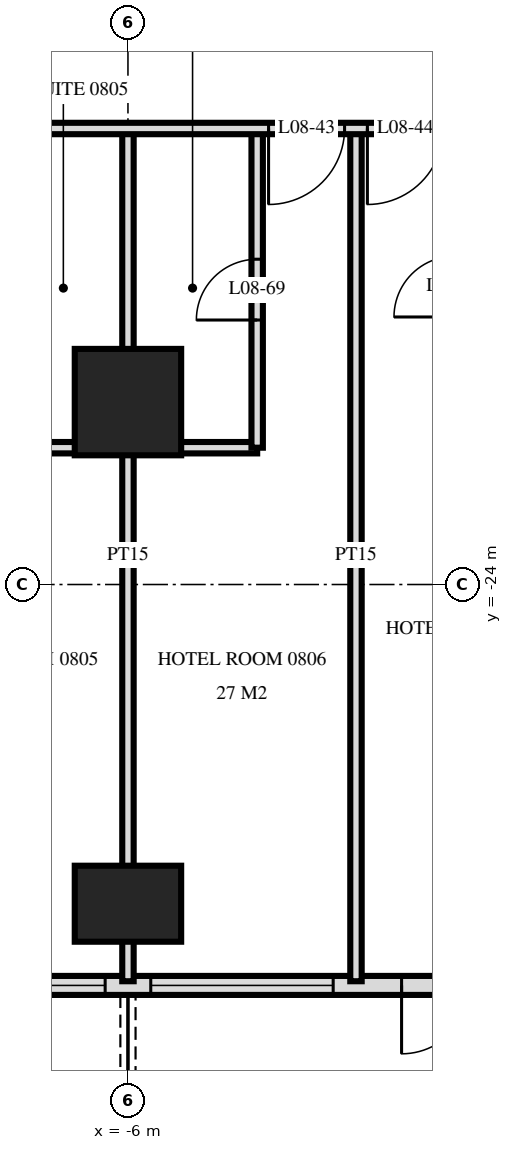
"""IFC4 building model, lengths in metres.
Left out: names, types, materials, properties, quantities, classifications, styles, units other than length and angle.
Written with IfcOpenShell. Run it as: python <this file> out.ifc"""

import sys

from ifc_helpers import new_model, si_unit, direction, frame, frame_2d, origin, origin_2d, place, context, subcontext, project, spatial, rectangle, extrude, element, fill, save


model = new_model("IFC4")
c1 = context("Model", 3, precision=1e-05, world=origin(), true_north=direction((0.0, 1.0)))
c2 = subcontext(c1, "Body", "Model", "MODEL_VIEW")
j1 = project(units=[si_unit("LENGTHUNIT", "METRE"), si_unit("PLANEANGLEUNIT", "RADIAN")], contexts=[c1])
p1 = place(None, origin())
s1 = spatial("IfcSite", under=j1, at=p1, CompositionType="ELEMENT")
p2 = place(p1, origin())
s2 = spatial("IfcBuilding", under=s1, at=p2, CompositionType="ELEMENT")
p3 = place(p2, frame((0.0, 0.0, 38.4)))
s3 = spatial("IfcBuildingStorey", under=s2, at=p3, CompositionType="ELEMENT", Elevation=38.4)
p4 = place(p3, frame((-6.0, -28.2, 0.0), z_axis=(0.0, 0.0, 1.0), x_axis=(1.0, 0.0, 0.0)))
e1 = element("IfcColumn", 1, at=p4, inside=s3, PredefinedType="COLUMN", context=c2, shape_type="SweptSolid", body=[
    extrude(rectangle(XDim=1.4, YDim=1.0, at=origin_2d()), origin(), (0.0, 0.0, 1.0), 3.6),
])
p5 = place(p3, frame((-6.0, -21.6, 0.0), z_axis=(0.0, 0.0, 1.0), x_axis=(1.0, 0.0, 0.0)))
e2 = element("IfcColumn", 2, at=p5, inside=s3, PredefinedType="COLUMN", context=c2, shape_type="SweptSolid", body=[
    extrude(rectangle(XDim=1.4, YDim=1.4, at=origin_2d()), origin(), (0.0, 0.0, 1.0), 3.6),
])
p6 = place(p3, frame((-28.775, -29.275, 0.0), z_axis=(0.0, 0.0, 1.0), x_axis=(1.0, 0.0, 0.0)))
e3 = element("IfcWall", 3, at=p6, inside=s3, PredefinedType="SOLIDWALL", context=c2, shape_type="SweptSolid", body=[
    extrude(rectangle(XDim=57.551, YDim=0.25, at=frame_2d((28.775, 0.0))), origin(), (0.0, 0.0, 1.0), 3.32),
])
p7 = place(p6, frame((0.575, 0.0, 0.0)))
e4 = element("IfcOpeningElement", 4, at=p7, cuts=e3, PredefinedType="OPENING", context=c2, shape_type="SweptSolid", body=[
    extrude(rectangle(XDim=1.8, YDim=2.4, at=frame_2d((0.9, 1.2))), frame((0.0, 0.135, 0.0), z_axis=(0.0, -1.0, 0.0), x_axis=(1.0, 0.0, 0.0)), (0.0, 0.0, 1.0), 0.27),
])
p8 = place(p6, frame((5.375, 0.0, 0.0)))
e5 = element("IfcOpeningElement", 5, at=p8, cuts=e3, PredefinedType="OPENING", context=c2, shape_type="SweptSolid", body=[
    extrude(rectangle(XDim=1.8, YDim=2.4, at=frame_2d((0.9, 1.2))), frame((0.0, 0.135, 0.0), z_axis=(0.0, -1.0, 0.0), x_axis=(1.0, 0.0, 0.0)), (0.0, 0.0, 1.0), 0.27),
])
p9 = place(p6, frame((8.075, 0.0, 0.3)))
e6 = element("IfcOpeningElement", 6, at=p9, cuts=e3, PredefinedType="OPENING", context=c2, shape_type="SweptSolid", body=[
    extrude(rectangle(XDim=2.4, YDim=2.1, at=frame_2d((1.2, 1.05))), frame((0.0, 0.135, 0.0), z_axis=(0.0, -1.0, 0.0), x_axis=(1.0, 0.0, 0.0)), (0.0, 0.0, 1.0), 0.27),
])
p10 = place(p6, frame((11.375, 0.0, 0.0)))
e7 = element("IfcOpeningElement", 7, at=p10, cuts=e3, PredefinedType="OPENING", context=c2, shape_type="SweptSolid", body=[
    extrude(rectangle(XDim=1.8, YDim=2.4, at=frame_2d((0.9, 1.2))), frame((0.0, 0.135, 0.0), z_axis=(0.0, -1.0, 0.0), x_axis=(1.0, 0.0, 0.0)), (0.0, 0.0, 1.0), 0.27),
])
p11 = place(p6, frame((14.075, 0.0, 0.3)))
e8 = element("IfcOpeningElement", 8, at=p11, cuts=e3, PredefinedType="OPENING", context=c2, shape_type="SweptSolid", body=[
    extrude(rectangle(XDim=2.4, YDim=2.1, at=frame_2d((1.2, 1.05))), frame((0.0, 0.135, 0.0), z_axis=(0.0, -1.0, 0.0), x_axis=(1.0, 0.0, 0.0)), (0.0, 0.0, 1.0), 0.27),
])
p12 = place(p6, frame((17.375, 0.0, 0.0)))
e9 = element("IfcOpeningElement", 9, at=p12, cuts=e3, PredefinedType="OPENING", context=c2, shape_type="SweptSolid", body=[
    extrude(rectangle(XDim=1.8, YDim=2.4, at=frame_2d((0.9, 1.2))), frame((0.0, 0.135, 0.0), z_axis=(0.0, -1.0, 0.0), x_axis=(1.0, 0.0, 0.0)), (0.0, 0.0, 1.0), 0.27),
])
p13 = place(p6, frame((20.075, 0.0, 0.3)))
e10 = element("IfcOpeningElement", 10, at=p13, cuts=e3, PredefinedType="OPENING", context=c2, shape_type="SweptSolid", body=[
    extrude(rectangle(XDim=2.4, YDim=2.1, at=frame_2d((1.2, 1.05))), frame((0.0, 0.135, 0.0), z_axis=(0.0, -1.0, 0.0), x_axis=(1.0, 0.0, 0.0)), (0.0, 0.0, 1.0), 0.27),
])
p14 = place(p6, frame((23.075, 0.0, 0.3)))
e11 = element("IfcOpeningElement", 11, at=p14, cuts=e3, PredefinedType="OPENING", context=c2, shape_type="SweptSolid", body=[
    extrude(rectangle(XDim=2.4, YDim=2.1, at=frame_2d((1.2, 1.05))), frame((0.0, 0.135, 0.0), z_axis=(0.0, -1.0, 0.0), x_axis=(1.0, 0.0, 0.0)), (0.0, 0.0, 1.0), 0.27),
])
p15 = place(p6, frame((26.375, 0.0, 0.0)))
e12 = element("IfcOpeningElement", 12, at=p15, cuts=e3, PredefinedType="OPENING", context=c2, shape_type="SweptSolid", body=[
    extrude(rectangle(XDim=1.8, YDim=2.4, at=frame_2d((0.9, 1.2))), frame((0.0, 0.135, 0.0), z_axis=(0.0, -1.0, 0.0), x_axis=(1.0, 0.0, 0.0)), (0.0, 0.0, 1.0), 0.27),
])
p16 = place(p6, frame((29.375, 0.0, 0.0)))
e13 = element("IfcOpeningElement", 13, at=p16, cuts=e3, PredefinedType="OPENING", context=c2, shape_type="SweptSolid", body=[
    extrude(rectangle(XDim=1.8, YDim=2.4, at=frame_2d((0.9, 1.2))), frame((0.0, 0.135, 0.0), z_axis=(0.0, -1.0, 0.0), x_axis=(1.0, 0.0, 0.0)), (0.0, 0.0, 1.0), 0.27),
])
p17 = place(p6, frame((32.075, 0.0, 0.3)))
e14 = element("IfcOpeningElement", 14, at=p17, cuts=e3, PredefinedType="OPENING", context=c2, shape_type="SweptSolid", body=[
    extrude(rectangle(XDim=2.4, YDim=2.1, at=frame_2d((1.2, 1.05))), frame((0.0, 0.135, 0.0), z_axis=(0.0, -1.0, 0.0), x_axis=(1.0, 0.0, 0.0)), (0.0, 0.0, 1.0), 0.27),
])
p18 = place(p6, frame((35.375, 0.0, 0.0)))
e15 = element("IfcOpeningElement", 15, at=p18, cuts=e3, PredefinedType="OPENING", context=c2, shape_type="SweptSolid", body=[
    extrude(rectangle(XDim=1.8, YDim=2.4, at=frame_2d((0.9, 1.2))), frame((0.0, 0.135, 0.0), z_axis=(0.0, -1.0, 0.0), x_axis=(1.0, 0.0, 0.0)), (0.0, 0.0, 1.0), 0.27),
])
p19 = place(p6, frame((38.075, 0.0, 0.3)))
e16 = element("IfcOpeningElement", 16, at=p19, cuts=e3, PredefinedType="OPENING", context=c2, shape_type="SweptSolid", body=[
    extrude(rectangle(XDim=2.4, YDim=2.1, at=frame_2d((1.2, 1.05))), frame((0.0, 0.135, 0.0), z_axis=(0.0, -1.0, 0.0), x_axis=(1.0, 0.0, 0.0)), (0.0, 0.0, 1.0), 0.27),
])
p20 = place(p6, frame((41.375, 0.0, 0.0)))
e17 = element("IfcOpeningElement", 17, at=p20, cuts=e3, PredefinedType="OPENING", context=c2, shape_type="SweptSolid", body=[
    extrude(rectangle(XDim=1.8, YDim=2.4, at=frame_2d((0.9, 1.2))), frame((0.0, 0.135, 0.0), z_axis=(0.0, -1.0, 0.0), x_axis=(1.0, 0.0, 0.0)), (0.0, 0.0, 1.0), 0.27),
])
p21 = place(p6, frame((44.075, 0.0, 0.3)))
e18 = element("IfcOpeningElement", 18, at=p21, cuts=e3, PredefinedType="OPENING", context=c2, shape_type="SweptSolid", body=[
    extrude(rectangle(XDim=2.4, YDim=2.1, at=frame_2d((1.2, 1.05))), frame((0.0, 0.135, 0.0), z_axis=(0.0, -1.0, 0.0), x_axis=(1.0, 0.0, 0.0)), (0.0, 0.0, 1.0), 0.27),
])
p22 = place(p6, frame((47.375, 0.0, 0.0)))
e19 = element("IfcOpeningElement", 19, at=p22, cuts=e3, PredefinedType="OPENING", context=c2, shape_type="SweptSolid", body=[
    extrude(rectangle(XDim=1.8, YDim=2.4, at=frame_2d((0.9, 1.2))), frame((0.0, 0.135, 0.0), z_axis=(0.0, -1.0, 0.0), x_axis=(1.0, 0.0, 0.0)), (0.0, 0.0, 1.0), 0.27),
])
p23 = place(p6, frame((50.075, 0.0, 0.3)))
e20 = element("IfcOpeningElement", 20, at=p23, cuts=e3, PredefinedType="OPENING", context=c2, shape_type="SweptSolid", body=[
    extrude(rectangle(XDim=2.4, YDim=2.1, at=frame_2d((1.2, 1.05))), frame((0.0, 0.135, 0.0), z_axis=(0.0, -1.0, 0.0), x_axis=(1.0, 0.0, 0.0)), (0.0, 0.0, 1.0), 0.27),
])
p24 = place(p6, frame((53.375, 0.0, 0.0)))
e21 = element("IfcOpeningElement", 21, at=p24, cuts=e3, PredefinedType="OPENING", context=c2, shape_type="SweptSolid", body=[
    extrude(rectangle(XDim=1.8, YDim=2.4, at=frame_2d((0.9, 1.2))), frame((0.0, 0.135, 0.0), z_axis=(0.0, -1.0, 0.0), x_axis=(1.0, 0.0, 0.0)), (0.0, 0.0, 1.0), 0.27),
])
p25 = place(p3, frame((-3.0, -29.22, 0.0), z_axis=(0.0, 0.0, 1.0), x_axis=(0.0, 1.0, 0.0)))
e22 = element("IfcWall", 22, at=p25, inside=s3, PredefinedType="PARTITIONING", context=c2, shape_type="SweptSolid", body=[
    extrude(rectangle(XDim=11.22, YDim=0.15, at=frame_2d((5.61, 0.0))), origin(), (0.0, 0.0, 1.0), 3.32),
])
p26 = place(p3, frame((-4.3, -22.2, 0.0), z_axis=(0.0, 0.0, 1.0), x_axis=(0.0, 1.0, 0.0)))
e23 = element("IfcWall", 23, at=p26, inside=s3, PredefinedType="PARTITIONING", context=c2, shape_type="SweptSolid", body=[
    extrude(rectangle(XDim=4.2, YDim=0.15, at=frame_2d((2.1, 0.0))), origin(), (0.0, 0.0, 1.0), 3.32),
])
p27 = place(p26, frame((1.68, 0.0, 0.0)))
e24 = element("IfcOpeningElement", 24, at=p27, cuts=e23, PredefinedType="OPENING", context=c2, shape_type="SweptSolid", body=[
    extrude(rectangle(XDim=0.8, YDim=2.1, at=frame_2d((0.4, 1.05))), frame((0.0, 0.085, 0.0), z_axis=(0.0, -1.0, 0.0), x_axis=(1.0, 0.0, 0.0)), (0.0, 0.0, 1.0), 0.17),
])
p28 = place(p3, frame((-6.0, -29.22, 0.0), z_axis=(0.0, 0.0, 1.0), x_axis=(0.0, 1.0, 0.0)))
e25 = element("IfcWall", 25, at=p28, inside=s3, PredefinedType="PARTITIONING", context=c2, shape_type="SweptSolid", body=[
    extrude(rectangle(XDim=11.22, YDim=0.15, at=frame_2d((5.61, 0.0))), origin(), (0.0, 0.0, 1.0), 3.32),
])
p29 = place(p3, frame((-7.7, -22.2, 0.0), z_axis=(0.0, 0.0, 1.0), x_axis=(1.0, 0.0, 0.0)))
e26 = element("IfcWall", 26, at=p29, inside=s3, PredefinedType="PARTITIONING", context=c2, shape_type="SweptSolid", body=[
    extrude(rectangle(XDim=3.4, YDim=0.15, at=frame_2d((1.7, 0.0))), origin(), (0.0, 0.0, 1.0), 3.32),
])
p30 = place(p3, frame((-33.12, -18.0, 0.0), z_axis=(0.0, 0.0, 1.0), x_axis=(1.0, 0.0, 0.0)))
e27 = element("IfcWall", 27, at=p30, inside=s3, PredefinedType="PARTITIONING", context=c2, shape_type="SweptSolid", body=[
    extrude(rectangle(XDim=66.24, YDim=0.15, at=frame_2d((33.12, 0.0))), origin(), (0.0, 0.0, 1.0), 3.32),
])
p31 = place(p30, frame((12.27, 0.0, 0.0)))
e28 = element("IfcOpeningElement", 28, at=p31, cuts=e27, PredefinedType="OPENING", context=c2, shape_type="SweptSolid", body=[
    extrude(rectangle(XDim=1.0, YDim=2.1, at=frame_2d((0.5, 1.05))), frame((0.0, 0.085, 0.0), z_axis=(0.0, -1.0, 0.0), x_axis=(1.0, 0.0, 0.0)), (0.0, 0.0, 1.0), 0.17),
])
p32 = place(p30, frame((16.97, 0.0, 0.0)))
e29 = element("IfcOpeningElement", 29, at=p32, cuts=e27, PredefinedType="OPENING", context=c2, shape_type="SweptSolid", body=[
    extrude(rectangle(XDim=1.0, YDim=2.1, at=frame_2d((0.5, 1.05))), frame((0.0, 0.085, 0.0), z_axis=(0.0, -1.0, 0.0), x_axis=(1.0, 0.0, 0.0)), (0.0, 0.0, 1.0), 0.17),
])
p33 = place(p30, frame((18.27, 0.0, 0.0)))
e30 = element("IfcOpeningElement", 30, at=p33, cuts=e27, PredefinedType="OPENING", context=c2, shape_type="SweptSolid", body=[
    extrude(rectangle(XDim=1.0, YDim=2.1, at=frame_2d((0.5, 1.05))), frame((0.0, 0.085, 0.0), z_axis=(0.0, -1.0, 0.0), x_axis=(1.0, 0.0, 0.0)), (0.0, 0.0, 1.0), 0.17),
])
p34 = place(p30, frame((22.97, 0.0, 0.0)))
e31 = element("IfcOpeningElement", 31, at=p34, cuts=e27, PredefinedType="OPENING", context=c2, shape_type="SweptSolid", body=[
    extrude(rectangle(XDim=1.0, YDim=2.1, at=frame_2d((0.5, 1.05))), frame((0.0, 0.085, 0.0), z_axis=(0.0, -1.0, 0.0), x_axis=(1.0, 0.0, 0.0)), (0.0, 0.0, 1.0), 0.17),
])
p35 = place(p30, frame((24.27, 0.0, 0.0)))
e32 = element("IfcOpeningElement", 32, at=p35, cuts=e27, PredefinedType="OPENING", context=c2, shape_type="SweptSolid", body=[
    extrude(rectangle(XDim=1.0, YDim=2.1, at=frame_2d((0.5, 1.05))), frame((0.0, 0.085, 0.0), z_axis=(0.0, -1.0, 0.0), x_axis=(1.0, 0.0, 0.0)), (0.0, 0.0, 1.0), 0.17),
])
p36 = place(p30, frame((28.97, 0.0, 0.0)))
e33 = element("IfcOpeningElement", 33, at=p36, cuts=e27, PredefinedType="OPENING", context=c2, shape_type="SweptSolid", body=[
    extrude(rectangle(XDim=1.0, YDim=2.1, at=frame_2d((0.5, 1.05))), frame((0.0, 0.085, 0.0), z_axis=(0.0, -1.0, 0.0), x_axis=(1.0, 0.0, 0.0)), (0.0, 0.0, 1.0), 0.17),
])
p37 = place(p30, frame((30.27, 0.0, 0.0)))
e34 = element("IfcOpeningElement", 34, at=p37, cuts=e27, PredefinedType="OPENING", context=c2, shape_type="SweptSolid", body=[
    extrude(rectangle(XDim=1.0, YDim=2.1, at=frame_2d((0.5, 1.05))), frame((0.0, 0.085, 0.0), z_axis=(0.0, -1.0, 0.0), x_axis=(1.0, 0.0, 0.0)), (0.0, 0.0, 1.0), 0.17),
])
p38 = place(p30, frame((34.97, 0.0, 0.0)))
e35 = element("IfcOpeningElement", 35, at=p38, cuts=e27, PredefinedType="OPENING", context=c2, shape_type="SweptSolid", body=[
    extrude(rectangle(XDim=1.0, YDim=2.1, at=frame_2d((0.5, 1.05))), frame((0.0, 0.085, 0.0), z_axis=(0.0, -1.0, 0.0), x_axis=(1.0, 0.0, 0.0)), (0.0, 0.0, 1.0), 0.17),
])
p39 = place(p30, frame((37.27, 0.0, 0.0)))
e36 = element("IfcOpeningElement", 36, at=p39, cuts=e27, PredefinedType="OPENING", context=c2, shape_type="SweptSolid", body=[
    extrude(rectangle(XDim=1.0, YDim=2.1, at=frame_2d((0.5, 1.05))), frame((0.0, 0.085, 0.0), z_axis=(0.0, -1.0, 0.0), x_axis=(1.0, 0.0, 0.0)), (0.0, 0.0, 1.0), 0.17),
])
p40 = place(p30, frame((43.97, 0.0, 0.0)))
e37 = element("IfcOpeningElement", 37, at=p40, cuts=e27, PredefinedType="OPENING", context=c2, shape_type="SweptSolid", body=[
    extrude(rectangle(XDim=1.0, YDim=2.1, at=frame_2d((0.5, 1.05))), frame((0.0, 0.085, 0.0), z_axis=(0.0, -1.0, 0.0), x_axis=(1.0, 0.0, 0.0)), (0.0, 0.0, 1.0), 0.17),
])
p41 = place(p30, frame((45.27, 0.0, 0.0)))
e38 = element("IfcOpeningElement", 38, at=p41, cuts=e27, PredefinedType="OPENING", context=c2, shape_type="SweptSolid", body=[
    extrude(rectangle(XDim=1.0, YDim=2.1, at=frame_2d((0.5, 1.05))), frame((0.0, 0.085, 0.0), z_axis=(0.0, -1.0, 0.0), x_axis=(1.0, 0.0, 0.0)), (0.0, 0.0, 1.0), 0.17),
])
p42 = place(p30, frame((51.22, 0.0, 0.0)))
e39 = element("IfcOpeningElement", 39, at=p42, cuts=e27, PredefinedType="OPENING", context=c2, shape_type="SweptSolid", body=[
    extrude(rectangle(XDim=1.0, YDim=2.1, at=frame_2d((0.5, 1.05))), frame((0.0, 0.085, 0.0), z_axis=(0.0, -1.0, 0.0), x_axis=(1.0, 0.0, 0.0)), (0.0, 0.0, 1.0), 0.17),
])
p43 = place(p30, frame((54.27, 0.0, 0.0)))
e40 = element("IfcOpeningElement", 40, at=p43, cuts=e27, PredefinedType="OPENING", context=c2, shape_type="SweptSolid", body=[
    extrude(rectangle(XDim=1.0, YDim=2.1, at=frame_2d((0.5, 1.05))), frame((0.0, 0.085, 0.0), z_axis=(0.0, -1.0, 0.0), x_axis=(1.0, 0.0, 0.0)), (0.0, 0.0, 1.0), 0.17),
])
p44 = place(p30, frame((6.07, 0.0, 0.0)))
e41 = element("IfcOpeningElement", 41, at=p44, cuts=e27, PredefinedType="OPENING", context=c2, shape_type="SweptSolid", body=[
    extrude(rectangle(XDim=1.0, YDim=2.1, at=frame_2d((0.5, 1.05))), frame((0.0, 0.085, 0.0), z_axis=(0.0, -1.0, 0.0), x_axis=(1.0, 0.0, 0.0)), (0.0, 0.0, 1.0), 0.17),
])
p45 = place(p30, frame((63.37, 0.0, 0.0)))
e42 = element("IfcOpeningElement", 42, at=p45, cuts=e27, PredefinedType="OPENING", context=c2, shape_type="SweptSolid", body=[
    extrude(rectangle(XDim=1.0, YDim=2.1, at=frame_2d((0.5, 1.05))), frame((0.0, 0.085, 0.0), z_axis=(0.0, -1.0, 0.0), x_axis=(1.0, 0.0, 0.0)), (0.0, 0.0, 1.0), 0.17),
])
p46 = place(p13, origin())
e43 = element("IfcWindow", 43, at=p46, inside=s3, PartitioningType="SINGLE_PANEL", PredefinedType="WINDOW", context=c2, shape_type="SweptSolid", body=[
    extrude(rectangle(XDim=2.4, YDim=2.1, at=frame_2d((1.2, 1.05))), frame((0.0, 0.03, 0.0), z_axis=(0.0, -1.0, 0.0), x_axis=(1.0, 0.0, 0.0)), (0.0, 0.0, 1.0), 0.06),
])
fill(e10, e43)
p47 = place(p14, origin())
e44 = element("IfcWindow", 44, at=p47, inside=s3, PartitioningType="SINGLE_PANEL", PredefinedType="WINDOW", context=c2, shape_type="SweptSolid", body=[
    extrude(rectangle(XDim=2.4, YDim=2.1, at=frame_2d((1.2, 1.05))), frame((0.0, 0.03, 0.0), z_axis=(0.0, -1.0, 0.0), x_axis=(1.0, 0.0, 0.0)), (0.0, 0.0, 1.0), 0.06),
])
fill(e11, e44)
p48 = place(p15, frame((0.9, 0.0, 0.0), z_axis=(0.0, 0.0, 1.0), x_axis=(-1.0, 0.0, 0.0)))
e45 = element("IfcDoor", 45, at=p48, inside=s3, OperationType="DOUBLE_DOOR_SINGLE_SWING", PredefinedType="DOOR", context=c2, shape_type="SweptSolid", body=[
    extrude(rectangle(XDim=1.8, YDim=2.4, at=frame_2d((0.0, 1.2))), frame((0.0, -0.025, 0.0), z_axis=(0.0, 1.0, 0.0), x_axis=(-1.0, 0.0, 0.0)), (0.0, 0.0, 1.0), 0.05),
])
fill(e12, e45)
p49 = place(p36, frame((0.5, 0.0, 0.0), z_axis=(0.0, 0.0, 1.0), x_axis=(-1.0, 0.0, 0.0)))
e46 = element("IfcDoor", 46, at=p49, inside=s3, OperationType="SINGLE_SWING_LEFT", PredefinedType="DOOR", context=c2, shape_type="SweptSolid", body=[
    extrude(rectangle(XDim=1.0, YDim=2.1, at=frame_2d((0.0, 1.05))), frame((0.0, -0.025, 0.0), z_axis=(0.0, 1.0, 0.0), x_axis=(-1.0, 0.0, 0.0)), (0.0, 0.0, 1.0), 0.05),
])
fill(e33, e46)
p50 = place(p37, frame((0.5, 0.0, 0.0), z_axis=(0.0, 0.0, 1.0), x_axis=(-1.0, 0.0, 0.0)))
e47 = element("IfcDoor", 47, at=p50, inside=s3, OperationType="SINGLE_SWING_LEFT", PredefinedType="DOOR", context=c2, shape_type="SweptSolid", body=[
    extrude(rectangle(XDim=1.0, YDim=2.1, at=frame_2d((0.0, 1.05))), frame((0.0, -0.025, 0.0), z_axis=(0.0, 1.0, 0.0), x_axis=(-1.0, 0.0, 0.0)), (0.0, 0.0, 1.0), 0.05),
])
fill(e34, e47)
p51 = place(p27, origin())
e48 = element("IfcDoor", 48, at=p51, inside=s3, OperationType="SINGLE_SWING_RIGHT", PredefinedType="DOOR", context=c2, shape_type="SweptSolid", body=[
    extrude(rectangle(XDim=0.8, YDim=2.1, at=frame_2d((0.4, 1.05))), frame((0.0, 0.025, 0.0), z_axis=(0.0, -1.0, 0.0), x_axis=(1.0, 0.0, 0.0)), (0.0, 0.0, 1.0), 0.05),
])
fill(e24, e48)
save(model, sys.argv[1])
